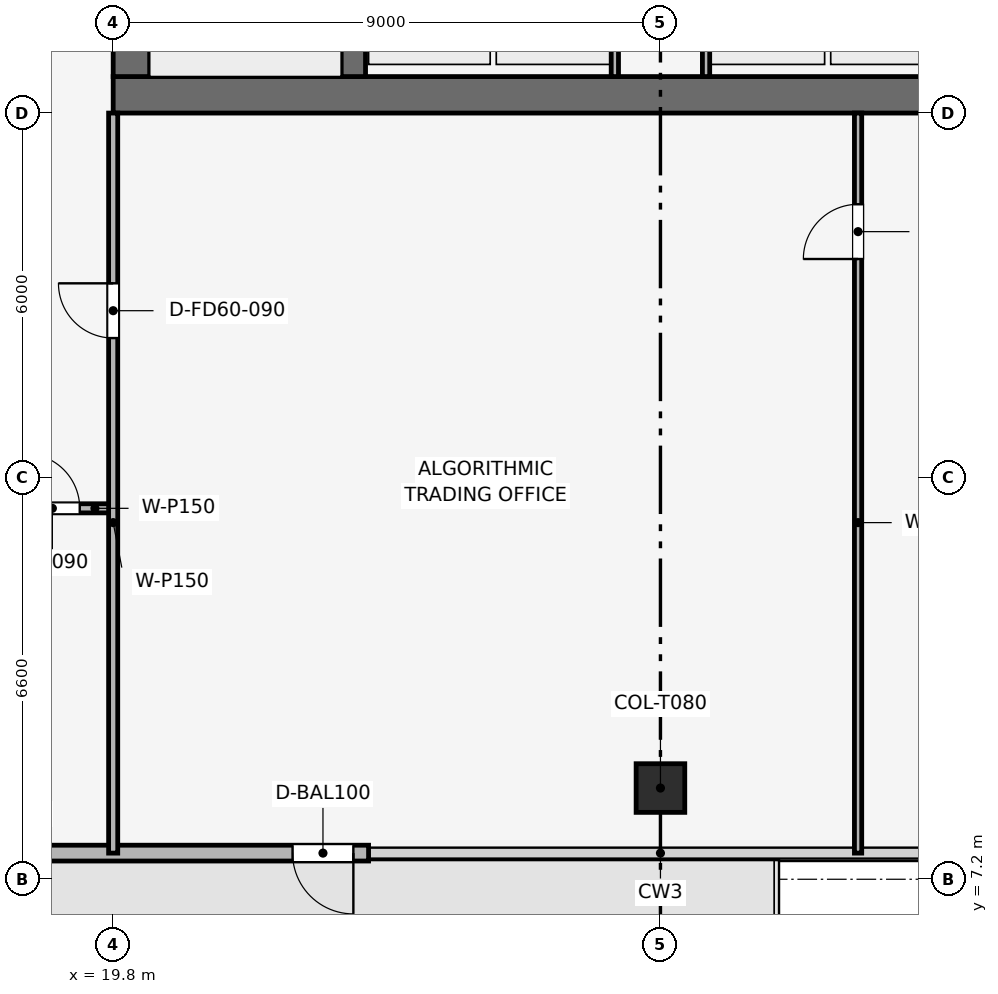
"""IFC4 building model, lengths in metres.
Left out: names, types, materials, properties, quantities, classifications, styles, units other than length and angle.
Written with IfcOpenShell. Run it as: python <this file> out.ifc"""

import sys

from ifc_helpers import new_model, si_unit, direction, frame, frame_2d, origin, origin_2d, place, context, subcontext, project, spatial, rectangle, extrude, element, fill, save


model = new_model("IFC4")
c1 = context("Model", 3, precision=1e-05, world=origin(), true_north=direction((0.0, 1.0)))
c2 = subcontext(c1, "Body", "Model", "MODEL_VIEW")
j1 = project(units=[si_unit("LENGTHUNIT", "METRE"), si_unit("PLANEANGLEUNIT", "RADIAN")], contexts=[c1])
p1 = place(None, origin())
s1 = spatial("IfcSite", under=j1, at=p1, CompositionType="ELEMENT")
p2 = place(p1, origin())
s2 = spatial("IfcBuilding", under=s1, at=p2, CompositionType="ELEMENT")
p3 = place(p2, frame((0.0, 0.0, 348.0)))
s3 = spatial("IfcBuildingStorey", under=s2, at=p3, CompositionType="ELEMENT", Elevation=348.0)
p4 = place(p3, frame((19.8, 20.1, 0.0), z_axis=(0.0, 0.0, 1.0), x_axis=(1.0, 0.0, 0.0)))
e1 = element("IfcWall", 1, at=p4, inside=s3, PredefinedType="SHEAR", context=c2, shape_type="SweptSolid", body=[
    extrude(rectangle(XDim=18.0, YDim=0.6, at=frame_2d((9.0, 0.0))), origin(), (0.0, 0.0, 1.0), 3.75),
])
p5 = place(p3, frame((20.1, 20.4, 0.0), z_axis=(0.0, 0.0, 1.0), x_axis=(0.0, 1.0, 0.0)))
e2 = element("IfcWall", 2, at=p5, inside=s3, PredefinedType="SHEAR", context=c2, shape_type="SweptSolid", body=[
    extrude(rectangle(XDim=16.8, YDim=0.6, at=frame_2d((8.4, 0.0))), origin(), (0.0, 0.0, 1.0), 3.75),
])
p6 = place(p5, frame((10.4, 0.0, 0.0)))
e3 = element("IfcOpeningElement", 3, at=p6, cuts=e2, PredefinedType="OPENING", context=c2, shape_type="SweptSolid", body=[
    extrude(rectangle(XDim=1.1, YDim=2.15, at=frame_2d((0.55, 1.075))), frame((0.0, 0.31, 0.0), z_axis=(0.0, -1.0, 0.0), x_axis=(1.0, 0.0, 0.0)), (0.0, 0.0, 1.0), 0.62),
])
p7 = place(p3, frame((23.75, 20.4, 0.0), z_axis=(0.0, 0.0, 1.0), x_axis=(0.0, 1.0, 0.0)))
e4 = element("IfcWall", 4, at=p7, inside=s3, PredefinedType="SHEAR", context=c2, shape_type="SweptSolid", body=[
    extrude(rectangle(XDim=16.8, YDim=0.4, at=frame_2d((8.4, 0.0))), origin(), (0.0, 0.0, 1.0), 3.75),
])
p8 = place(p3, frame((28.8, 8.7, 0.003), z_axis=(0.0, 0.0, 1.0), x_axis=(1.0, 0.0, 0.0)))
e5 = element("IfcColumn", 5, at=p8, inside=s3, PredefinedType="COLUMN", context=c2, shape_type="SweptSolid", body=[
    extrude(rectangle(XDim=0.8, YDim=0.8, at=origin_2d()), origin(), (0.0, 0.0, 1.0), 3.504),
])
p9 = place(p3, frame((24.0, 7.63, 0.0), z_axis=(0.0, 0.0, 1.0), x_axis=(-1.0, 0.0, 0.0)))
e6 = element("IfcWall", 6, at=p9, inside=s3, PredefinedType="SOLIDWALL", context=c2, shape_type="SweptSolid", body=[
    extrude(rectangle(XDim=10.7, YDim=0.26, at=frame_2d((5.35, 0.0))), origin(), (0.0, 0.0, 1.0), 3.51),
])
p10 = place(p9, frame((0.25, 0.0, 0.0)))
e7 = element("IfcOpeningElement", 7, at=p10, cuts=e6, PredefinedType="OPENING", context=c2, shape_type="SweptSolid", body=[
    extrude(rectangle(XDim=1.0, YDim=2.2, at=frame_2d((0.5, 1.1))), frame((0.0, 0.14, 0.0), z_axis=(0.0, -1.0, 0.0), x_axis=(1.0, 0.0, 0.0)), (0.0, 0.0, 1.0), 0.28),
])
p11 = place(p3, frame((28.05, 20.4, 0.0), z_axis=(0.0, 0.0, 1.0), x_axis=(0.0, 1.0, 0.0)))
e8 = element("IfcWall", 8, at=p11, inside=s3, PredefinedType="PARTITIONING", context=c2, shape_type="SweptSolid", body=[
    extrude(rectangle(XDim=8.15, YDim=0.12, at=frame_2d((4.075, 0.0))), origin(), (0.0, 0.0, 1.0), 3.51),
])
p12 = place(p3, frame((29.55, 20.4, 0.0), z_axis=(0.0, 0.0, 1.0), x_axis=(0.0, 1.0, 0.0)))
e9 = element("IfcWall", 9, at=p12, inside=s3, PredefinedType="PARTITIONING", context=c2, shape_type="SweptSolid", body=[
    extrude(rectangle(XDim=2.75, YDim=0.12, at=frame_2d((1.375, 0.0))), origin(), (0.0, 0.0, 1.0), 3.51),
])
p13 = place(p3, frame((17.9, 13.3, 0.0), z_axis=(0.0, 0.0, 1.0), x_axis=(1.0, 0.0, 0.0)))
e10 = element("IfcWall", 10, at=p13, inside=s3, PredefinedType="PARTITIONING", context=c2, shape_type="SweptSolid", body=[
    extrude(rectangle(XDim=1.9, YDim=0.15, at=frame_2d((0.95, 0.0))), origin(), (0.0, 0.0, 1.0), 3.51),
])
p14 = place(p13, frame((0.45, 0.0, 0.0)))
e11 = element("IfcOpeningElement", 11, at=p14, cuts=e10, PredefinedType="OPENING", context=c2, shape_type="SweptSolid", body=[
    extrude(rectangle(XDim=0.9, YDim=2.1, at=frame_2d((0.45, 1.05))), frame((0.0, 0.085, 0.0), z_axis=(0.0, -1.0, 0.0), x_axis=(1.0, 0.0, 0.0)), (0.0, 0.0, 1.0), 0.17),
])
p15 = place(p3, frame((19.8, 7.63, 0.0), z_axis=(0.0, 0.0, 1.0), x_axis=(0.0, 1.0, 0.0)))
e12 = element("IfcWall", 12, at=p15, inside=s3, PredefinedType="PARTITIONING", context=c2, shape_type="SweptSolid", body=[
    extrude(rectangle(XDim=12.17, YDim=0.15, at=frame_2d((6.085, 0.0))), origin(), (0.0, 0.0, 1.0), 3.095),
])
p16 = place(p15, frame((8.47, 0.0, 0.0)))
e13 = element("IfcOpeningElement", 13, at=p16, cuts=e12, PredefinedType="OPENING", context=c2, shape_type="SweptSolid", body=[
    extrude(rectangle(XDim=0.9, YDim=2.1, at=frame_2d((0.45, 1.05))), frame((0.0, 0.085, 0.0), z_axis=(0.0, -1.0, 0.0), x_axis=(1.0, 0.0, 0.0)), (0.0, 0.0, 1.0), 0.17),
])
p17 = place(p3, frame((32.05, 7.63, 0.0), z_axis=(0.0, 0.0, 1.0), x_axis=(0.0, 1.0, 0.0)))
e14 = element("IfcWall", 14, at=p17, inside=s3, PredefinedType="PARTITIONING", context=c2, shape_type="SweptSolid", body=[
    extrude(rectangle(XDim=12.17, YDim=0.12, at=frame_2d((6.085, 0.0))), origin(), (0.0, 0.0, 1.0), 3.135),
])
p18 = place(p17, frame((9.77, 0.0, 0.0)))
e15 = element("IfcOpeningElement", 15, at=p18, cuts=e14, PredefinedType="OPENING", context=c2, shape_type="SweptSolid", body=[
    extrude(rectangle(XDim=0.9, YDim=2.1, at=frame_2d((0.45, 1.05))), frame((0.0, 0.07, 0.0), z_axis=(0.0, -1.0, 0.0), x_axis=(1.0, 0.0, 0.0)), (0.0, 0.0, 1.0), 0.14),
])
p19 = place(p10, origin())
e16 = element("IfcDoor", 16, at=p19, inside=s3, OperationType="SINGLE_SWING_LEFT", PredefinedType="DOOR", context=c2, shape_type="SweptSolid", body=[
    extrude(rectangle(XDim=1.0, YDim=2.2, at=frame_2d((0.5, 1.1))), frame((0.0, 0.025, 0.0), z_axis=(0.0, -1.0, 0.0), x_axis=(1.0, 0.0, 0.0)), (0.0, 0.0, 1.0), 0.05),
])
fill(e7, e16)
p20 = place(p14, origin())
e17 = element("IfcDoor", 17, at=p20, inside=s3, OperationType="SINGLE_SWING_LEFT", PredefinedType="DOOR", context=c2, shape_type="SweptSolid", body=[
    extrude(rectangle(XDim=0.9, YDim=2.1, at=frame_2d((0.45, 1.05))), frame((0.0, 0.025, 0.0), z_axis=(0.0, -1.0, 0.0), x_axis=(1.0, 0.0, 0.0)), (0.0, 0.0, 1.0), 0.05),
])
fill(e11, e17)
p21 = place(p16, origin())
e18 = element("IfcDoor", 18, at=p21, inside=s3, OperationType="SINGLE_SWING_RIGHT", PredefinedType="DOOR", context=c2, shape_type="SweptSolid", body=[
    extrude(rectangle(XDim=0.9, YDim=2.1, at=frame_2d((0.45, 1.05))), frame((0.0, 0.025, 0.0), z_axis=(0.0, -1.0, 0.0), x_axis=(1.0, 0.0, 0.0)), (0.0, 0.0, 1.0), 0.05),
])
fill(e13, e18)
p22 = place(p18, origin())
e19 = element("IfcDoor", 19, at=p22, inside=s3, OperationType="SINGLE_SWING_LEFT", PredefinedType="DOOR", context=c2, shape_type="SweptSolid", body=[
    extrude(rectangle(XDim=0.9, YDim=2.1, at=frame_2d((0.45, 1.05))), frame((0.0, 0.025, 0.0), z_axis=(0.0, -1.0, 0.0), x_axis=(1.0, 0.0, 0.0)), (0.0, 0.0, 1.0), 0.05),
])
fill(e15, e19)
save(model, sys.argv[1])
